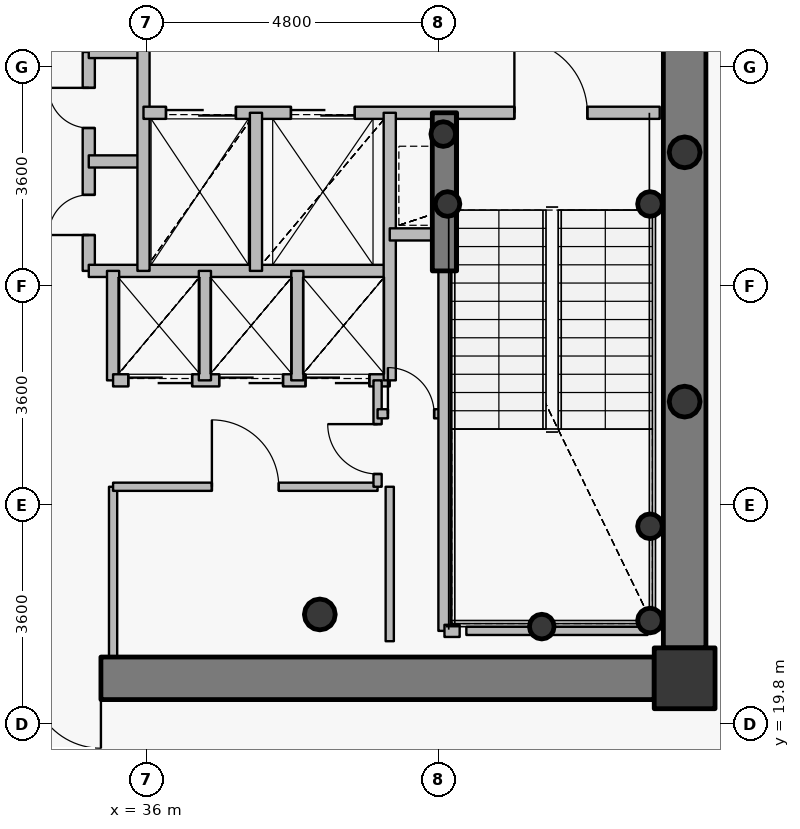
"""IFC4 building model, lengths in metres.
Left out: names, types, materials, properties, quantities, classifications, styles, units other than length and angle.
Written with IfcOpenShell. Run it as: python <this file> out.ifc"""

import sys

from ifc_helpers import new_model, si_unit, direction, frame, frame_2d, origin, origin_2d, place, context, subcontext, project, spatial, rectangle, hollow_circle, extrude, source, transform, mapped, element, fill, save


model = new_model("IFC4")
c1 = context("Model", 3, precision=1e-05, world=origin(), true_north=direction((0.0, 1.0)))
c2 = subcontext(c1, "Body", "Model", "MODEL_VIEW")
j1 = project(units=[si_unit("LENGTHUNIT", "METRE"), si_unit("PLANEANGLEUNIT", "RADIAN")], contexts=[c1])
p1 = place(None, origin())
s1 = spatial("IfcSite", under=j1, at=p1, CompositionType="ELEMENT")
p2 = place(p1, origin())
s2 = spatial("IfcBuilding", under=s1, at=p2, CompositionType="ELEMENT")
p3 = place(p2, frame((0.0, 0.0, 314.25)))
s3 = spatial("IfcBuildingStorey", under=s2, at=p3, CompositionType="ELEMENT", Elevation=314.25)
p4 = place(p3, frame((44.85, 20.55, 0.0), z_axis=(0.0, 0.0, 1.0), x_axis=(1.0, 0.0, 0.0)))
e1 = element("IfcColumn", 1, at=p4, inside=s3, PredefinedType="COLUMN", context=c2, shape_type="SweptSolid", body=[
    extrude(rectangle(XDim=1.0, YDim=1.0, at=origin_2d()), origin(), (0.0, 0.0, 1.0), 3.75),
])
p5 = place(p3, frame((38.85, 21.6, 0.0), z_axis=(0.0, 0.0, 1.0), x_axis=(1.0, 0.0, 0.0)))
e2 = element("IfcColumn", 2, at=p5, inside=s3, PredefinedType="COLUMN", context=c2, shape_type="SweptSolid", body=[
    extrude(hollow_circle(Radius=0.254, WallThickness=0.02, at=origin_2d()), origin(), (0.0, 0.0, 1.0), 3.75),
])
for number, where, z_axis, x_axis in (
    (3, (44.28, 21.5, 0.0), (0.0, 0.0, 1.0), (1.0, 0.0, 0.0)),
    (4, (44.28, 23.05, 0.0), (0.0, 0.0, 1.0), (1.0, 0.0, 0.0)),
    (5, (42.5, 21.4, 0.0), (0.0, 0.0, 1.0), (1.0, 0.0, 0.0)),
    (6, (40.95, 28.35, 0.0), (0.0, 0.0, 1.0), (1.0, 0.0, 0.0)),
    (7, (44.28, 28.35, 0.0), (0.0, 0.0, 1.0), (1.0, 0.0, 0.0)),
    (8, (40.88, 29.5, 0.0), (0.0, 0.0, 1.0), (1.0, 0.0, 0.0)),
):
    element("IfcColumn", number, at=place(p3, frame(where, z_axis=z_axis, x_axis=x_axis)), inside=s3, PredefinedType="COLUMN", context=c2, shape_type="SweptSolid", body=[
        extrude(hollow_circle(Radius=0.203, WallThickness=0.016, at=origin_2d()), origin(), (0.0, 0.0, 1.0), 3.75),
    ])
p6 = place(p3, frame((44.85, 32.95, 0.0), z_axis=(0.0, 0.0, 1.0), x_axis=(0.0, -1.0, 0.0)))
e9 = element("IfcWall", 9, at=p6, inside=s3, PredefinedType="SHEAR", context=c2, shape_type="SweptSolid", body=[
    extrude(rectangle(XDim=11.9, YDim=0.7, at=frame_2d((5.95, 0.0))), origin(), (0.0, 0.0, 1.0), 3.0),
])
p7 = place(p3, frame((44.35, 20.55, 0.0), z_axis=(0.0, 0.0, 1.0), x_axis=(-1.0, 0.0, 0.0)))
e10 = element("IfcWall", 10, at=p7, inside=s3, PredefinedType="SHEAR", context=c2, shape_type="SweptSolid", body=[
    extrude(rectangle(XDim=16.7, YDim=0.7, at=frame_2d((8.35, 0.0))), origin(), (0.0, 0.0, 1.0), 3.0),
])
p8 = place(p7, frame((12.925, 0.0, 0.0)))
e11 = element("IfcOpeningElement", 11, at=p8, cuts=e10, PredefinedType="OPENING", context=c2, shape_type="SweptSolid", body=[
    extrude(rectangle(XDim=1.15, YDim=2.15, at=origin_2d()), frame((0.575, 0.36, 1.075), z_axis=(0.0, -1.0, 0.0), x_axis=(1.0, 0.0, 0.0)), (0.0, 0.0, 1.0), 0.72),
])
p9 = place(p7, frame((9.1, 0.0, 0.0)))
e12 = element("IfcOpeningElement", 12, at=p9, cuts=e10, PredefinedType="OPENING", context=c2, shape_type="SweptSolid", body=[
    extrude(rectangle(XDim=1.15, YDim=2.15, at=origin_2d()), frame((0.575, 0.36, 1.075), z_axis=(0.0, -1.0, 0.0), x_axis=(1.0, 0.0, 0.0)), (0.0, 0.0, 1.0), 0.72),
])
p10 = place(p3, frame((40.9, 27.25, 0.0), z_axis=(0.0, 0.0, 1.0), x_axis=(0.0, 1.0, 0.0)))
e13 = element("IfcWall", 13, at=p10, inside=s3, PredefinedType="SHEAR", context=c2, shape_type="SweptSolid", body=[
    extrude(rectangle(XDim=2.6, YDim=0.4, at=frame_2d((1.3, 0.0))), origin(), (0.0, 0.0, 1.0), 3.05),
])
for number, where, z_axis, x_axis in (
    (14, (44.85, 25.1, 0.0), (0.0, 0.0, 1.0), (1.0, 0.0, 0.0)),
    (15, (44.85, 29.2, 0.0), (0.0, 0.0, 1.0), (1.0, 0.0, 0.0)),
):
    element("IfcColumn", number, at=place(p3, frame(where, z_axis=z_axis, x_axis=x_axis)), inside=s3, PredefinedType="COLUMN", context=c2, shape_type="SweptSolid", body=[
        extrude(hollow_circle(Radius=0.254, WallThickness=0.02, at=origin_2d()), origin(), (0.0, 0.0, 1.0), 3.75),
    ])
p11 = place(p3, frame((35.05, 27.25, 0.0), z_axis=(0.0, 0.0, 1.0), x_axis=(0.0, 1.0, 0.0)))
e16 = element("IfcWall", 16, at=p11, inside=s3, PredefinedType="PARTITIONING", context=c2, shape_type="SweptSolid", body=[
    extrude(rectangle(XDim=3.6, YDim=0.2, at=frame_2d((1.8, 0.0))), origin(), (0.0, 0.0, 1.0), 3.45),
])
p12 = place(p11, frame((0.59, 0.0, 0.0)))
e17 = element("IfcOpeningElement", 17, at=p12, cuts=e16, PredefinedType="OPENING", context=c2, shape_type="SweptSolid", body=[
    extrude(rectangle(XDim=0.66, YDim=2.05, at=origin_2d()), frame((0.33, 0.11, 1.025), z_axis=(0.0, -1.0, 0.0), x_axis=(1.0, 0.0, 0.0)), (0.0, 0.0, 1.0), 0.22),
])
p13 = place(p11, frame((2.35, 0.0, 0.0)))
e18 = element("IfcOpeningElement", 18, at=p13, cuts=e16, PredefinedType="OPENING", context=c2, shape_type="SweptSolid", body=[
    extrude(rectangle(XDim=0.66, YDim=2.05, at=origin_2d()), frame((0.33, 0.11, 1.025), z_axis=(0.0, -1.0, 0.0), x_axis=(1.0, 0.0, 0.0)), (0.0, 0.0, 1.0), 0.22),
])
p14 = place(p3, frame((35.05, 27.25, 0.0), z_axis=(0.0, 0.0, 1.0), x_axis=(1.0, 0.0, 0.0)))
e19 = element("IfcWall", 19, at=p14, inside=s3, PredefinedType="PARTITIONING", context=c2, shape_type="SweptSolid", body=[
    extrude(rectangle(XDim=4.95, YDim=0.2, at=frame_2d((2.475, 0.0))), origin(), (0.0, 0.0, 1.0), 3.035),
])
for number, where, z_axis, x_axis in (
    (20, (35.05, 29.05, 0.0), (0.0, 0.0, 1.0), (1.0, 0.0, 0.0)),
    (21, (35.05, 30.85, 0.0), (0.0, 0.0, 1.0), (1.0, 0.0, 0.0)),
):
    element("IfcWall", number, at=place(p3, frame(where, z_axis=z_axis, x_axis=x_axis)), inside=s3, PredefinedType="PARTITIONING", context=c2, shape_type="SweptSolid", body=[
        extrude(rectangle(XDim=0.9, YDim=0.2, at=frame_2d((0.45, 0.0))), origin(), (0.0, 0.0, 1.0), 3.45),
    ])
p15 = place(p3, frame((35.45, 20.9, 0.0), z_axis=(0.0, 0.0, 1.0), x_axis=(0.0, 1.0, 0.0)))
e22 = element("IfcWall", 22, at=p15, inside=s3, PredefinedType="PARTITIONING", context=c2, shape_type="SweptSolid", body=[
    extrude(rectangle(XDim=2.8, YDim=0.135, at=frame_2d((1.4, 0.0))), origin(), (0.0, 0.0, 1.0), 3.035),
])
p16 = place(p3, frame((35.45, 23.7, 0.0), z_axis=(0.0, 0.0, 1.0), x_axis=(1.0, 0.0, 0.0)))
e23 = element("IfcWall", 23, at=p16, inside=s3, PredefinedType="PARTITIONING", context=c2, shape_type="SweptSolid", body=[
    extrude(rectangle(XDim=4.35, YDim=0.135, at=frame_2d((2.175, 0.0))), origin(), (0.0, 0.0, 1.0), 3.035),
])
p17 = place(p16, frame((1.625, 0.0, 0.0)))
e24 = element("IfcOpeningElement", 24, at=p17, cuts=e23, PredefinedType="OPENING", context=c2, shape_type="SweptSolid", body=[
    extrude(rectangle(XDim=1.1, YDim=2.15, at=origin_2d()), frame((0.55, 0.078, 1.075), z_axis=(0.0, -1.0, 0.0), x_axis=(1.0, 0.0, 0.0)), (0.0, 0.0, 1.0), 0.155),
])
p18 = place(p3, frame((35.45, 25.45, 0.0), z_axis=(0.0, 0.0, 1.0), x_axis=(0.0, 1.0, 0.0)))
e25 = element("IfcWall", 25, at=p18, inside=s3, PredefinedType="PARTITIONING", context=c2, shape_type="SweptSolid", body=[
    extrude(rectangle(XDim=1.8, YDim=0.2, at=frame_2d((0.9, 0.0))), origin(), (0.0, 0.0, 1.0), 3.45),
])
p19 = place(p3, frame((35.45, 25.45, 0.0), z_axis=(0.0, 0.0, 1.0), x_axis=(1.0, 0.0, 0.0)))
e26 = element("IfcWall", 26, at=p19, inside=s3, PredefinedType="PARTITIONING", context=c2, shape_type="SweptSolid", body=[
    extrude(rectangle(XDim=4.55, YDim=0.2, at=frame_2d((2.275, 0.0))), origin(), (0.0, 0.0, 1.0), 3.035),
])
p20 = place(p19, frame((0.25, 0.0, 0.0)))
e27 = element("IfcOpeningElement", 27, at=p20, cuts=e26, PredefinedType="OPENING", context=c2, shape_type="SweptSolid", body=[
    extrude(rectangle(XDim=1.05, YDim=2.15, at=origin_2d()), frame((0.525, 0.11, 1.075), z_axis=(0.0, -1.0, 0.0), x_axis=(1.0, 0.0, 0.0)), (0.0, 0.0, 1.0), 0.22),
])
p21 = place(p19, frame((1.745, 0.0, 0.0)))
e28 = element("IfcOpeningElement", 28, at=p21, cuts=e26, PredefinedType="OPENING", context=c2, shape_type="SweptSolid", body=[
    extrude(rectangle(XDim=1.05, YDim=2.15, at=origin_2d()), frame((0.525, 0.11, 1.075), z_axis=(0.0, -1.0, 0.0), x_axis=(1.0, 0.0, 0.0)), (0.0, 0.0, 1.0), 0.22),
])
p22 = place(p19, frame((3.165, 0.0, 0.0)))
e29 = element("IfcOpeningElement", 29, at=p22, cuts=e26, PredefinedType="OPENING", context=c2, shape_type="SweptSolid", body=[
    extrude(rectangle(XDim=1.05, YDim=2.15, at=origin_2d()), frame((0.525, 0.11, 1.075), z_axis=(0.0, -1.0, 0.0), x_axis=(1.0, 0.0, 0.0)), (0.0, 0.0, 1.0), 0.22),
])
p23 = place(p3, frame((35.95, 27.25, 0.0), z_axis=(0.0, 0.0, 1.0), x_axis=(0.0, 1.0, 0.0)))
e30 = element("IfcWall", 30, at=p23, inside=s3, PredefinedType="PARTITIONING", context=c2, shape_type="SweptSolid", body=[
    extrude(rectangle(XDim=3.8, YDim=0.2, at=frame_2d((1.9, 0.0))), origin(), (0.0, 0.0, 1.0), 3.45),
])
p24 = place(p3, frame((35.95, 29.85, 0.0), z_axis=(0.0, 0.0, 1.0), x_axis=(1.0, 0.0, 0.0)))
e31 = element("IfcWall", 31, at=p24, inside=s3, PredefinedType="PARTITIONING", context=c2, shape_type="SweptSolid", body=[
    extrude(rectangle(XDim=8.49, YDim=0.2, at=frame_2d((4.245, 0.0))), origin(), (0.0, 0.0, 1.0), 3.035),
])
p25 = place(p24, frame((6.1, 0.0, 0.0)))
e32 = element("IfcOpeningElement", 32, at=p25, cuts=e31, PredefinedType="OPENING", context=c2, shape_type="SweptSolid", body=[
    extrude(rectangle(XDim=1.2, YDim=2.15, at=origin_2d()), frame((0.6, 0.11, 1.075), z_axis=(0.0, -1.0, 0.0), x_axis=(1.0, 0.0, 0.0)), (0.0, 0.0, 1.0), 0.22),
])
p26 = place(p24, frame((0.37, 0.0, 0.0)))
e33 = element("IfcOpeningElement", 33, at=p26, cuts=e31, PredefinedType="OPENING", context=c2, shape_type="SweptSolid", body=[
    extrude(rectangle(XDim=1.15, YDim=2.15, at=origin_2d()), frame((0.575, 0.11, 1.075), z_axis=(0.0, -1.0, 0.0), x_axis=(1.0, 0.0, 0.0)), (0.0, 0.0, 1.0), 0.22),
])
p27 = place(p24, frame((2.425, 0.0, 0.0)))
e34 = element("IfcOpeningElement", 34, at=p27, cuts=e31, PredefinedType="OPENING", context=c2, shape_type="SweptSolid", body=[
    extrude(rectangle(XDim=1.05, YDim=2.15, at=origin_2d()), frame((0.525, 0.11, 1.075), z_axis=(0.0, -1.0, 0.0), x_axis=(1.0, 0.0, 0.0)), (0.0, 0.0, 1.0), 0.22),
])
p28 = place(p3, frame((36.96, 25.45, 0.0), z_axis=(0.0, 0.0, 1.0), x_axis=(0.0, 1.0, 0.0)))
e35 = element("IfcWall", 35, at=p28, inside=s3, PredefinedType="PARTITIONING", context=c2, shape_type="SweptSolid", body=[
    extrude(rectangle(XDim=1.8, YDim=0.2, at=frame_2d((0.9, 0.0))), origin(), (0.0, 0.0, 1.0), 3.45),
])
p29 = place(p3, frame((37.8, 27.25, 0.0), z_axis=(0.0, 0.0, 1.0), x_axis=(0.0, 1.0, 0.0)))
e36 = element("IfcWall", 36, at=p29, inside=s3, PredefinedType="PARTITIONING", context=c2, shape_type="SweptSolid", body=[
    extrude(rectangle(XDim=2.6, YDim=0.2, at=frame_2d((1.3, 0.0))), origin(), (0.0, 0.0, 1.0), 3.45),
])
p30 = place(p3, frame((38.48, 25.45, 0.0), z_axis=(0.0, 0.0, 1.0), x_axis=(0.0, 1.0, 0.0)))
e37 = element("IfcWall", 37, at=p30, inside=s3, PredefinedType="PARTITIONING", context=c2, shape_type="SweptSolid", body=[
    extrude(rectangle(XDim=1.8, YDim=0.2, at=frame_2d((0.9, 0.0))), origin(), (0.0, 0.0, 1.0), 3.45),
])
p31 = place(p3, frame((39.8, 23.7, 0.0), z_axis=(0.0, 0.0, 1.0), x_axis=(0.0, 1.0, 0.0)))
e38 = element("IfcWall", 38, at=p31, inside=s3, PredefinedType="PARTITIONING", context=c2, shape_type="SweptSolid", body=[
    extrude(rectangle(XDim=1.75, YDim=0.135, at=frame_2d((0.875, 0.0))), origin(), (0.0, 0.0, 1.0), 3.45),
])
p32 = place(p31, frame((0.21, 0.0, 0.0)))
e39 = element("IfcOpeningElement", 39, at=p32, cuts=e38, PredefinedType="OPENING", context=c2, shape_type="SweptSolid", body=[
    extrude(rectangle(XDim=0.82, YDim=2.1, at=origin_2d()), frame((0.41, 0.078, 1.05), z_axis=(0.0, -1.0, 0.0), x_axis=(1.0, 0.0, 0.0)), (0.0, 0.0, 1.0), 0.155),
])
p33 = place(p3, frame((39.8, 24.9, 0.0), z_axis=(0.0, 0.0, 1.0), x_axis=(1.0, 0.0, 0.0)))
e40 = element("IfcWall", 40, at=p33, inside=s3, PredefinedType="PARTITIONING", context=c2, shape_type="SweptSolid", body=[
    extrude(rectangle(XDim=1.1, YDim=0.15, at=frame_2d((0.55, 0.0))), origin(), (0.0, 0.0, 1.0), 3.45),
])
p34 = place(p33, frame((0.17, 0.0, 0.0)))
e41 = element("IfcOpeningElement", 41, at=p34, cuts=e40, PredefinedType="OPENING", context=c2, shape_type="SweptSolid", body=[
    extrude(rectangle(XDim=0.76, YDim=2.1, at=origin_2d()), frame((0.38, 0.085, 1.05), z_axis=(0.0, -1.0, 0.0), x_axis=(1.0, 0.0, 0.0)), (0.0, 0.0, 1.0), 0.17),
])
p35 = place(p3, frame((40.0, 25.45, 0.0), z_axis=(0.0, 0.0, 1.0), x_axis=(0.0, 1.0, 0.0)))
e42 = element("IfcWall", 42, at=p35, inside=s3, PredefinedType="PARTITIONING", context=c2, shape_type="SweptSolid", body=[
    extrude(rectangle(XDim=4.4, YDim=0.2, at=frame_2d((2.2, 0.0))), origin(), (0.0, 0.0, 1.0), 3.45),
])
p36 = place(p3, frame((40.0, 27.85, 0.0), z_axis=(0.0, 0.0, 1.0), x_axis=(1.0, 0.0, 0.0)))
e43 = element("IfcWall", 43, at=p36, inside=s3, PredefinedType="PARTITIONING", context=c2, shape_type="SweptSolid", body=[
    extrude(rectangle(XDim=0.9, YDim=0.2, at=frame_2d((0.45, 0.0))), origin(), (0.0, 0.0, 1.0), 3.45),
])
p37 = place(p3, frame((40.9, 21.33, 0.0), z_axis=(0.0, 0.0, 1.0), x_axis=(0.0, 1.0, 0.0)))
e44 = element("IfcWall", 44, at=p37, inside=s3, PredefinedType="PARTITIONING", context=c2, shape_type="SweptSolid", body=[
    extrude(rectangle(XDim=5.91, YDim=0.2, at=frame_2d((2.955, 0.0))), origin(), (0.0, 0.0, 1.0), 2.985),
])
p38 = place(p3, frame((40.9, 21.33, 0.0), z_axis=(0.0, 0.0, 1.0), x_axis=(1.0, 0.0, 0.0)))
e45 = element("IfcWall", 45, at=p38, inside=s3, PredefinedType="PARTITIONING", context=c2, shape_type="SweptSolid", body=[
    extrude(rectangle(XDim=0.25, YDim=0.2, at=frame_2d((0.125, 0.0))), origin(), (0.0, 0.0, 1.0), 2.985),
])
p39 = place(p3, frame((44.24, 21.33, 0.0), z_axis=(0.0, 0.0, 1.0), x_axis=(-1.0, 0.0, 0.0)))
e46 = element("IfcWall", 46, at=p39, inside=s3, PredefinedType="PARTITIONING", context=c2, shape_type="SweptSolid", body=[
    extrude(rectangle(XDim=2.98, YDim=0.135, at=frame_2d((1.49, 0.0))), origin(), (0.0, 0.0, 1.0), 2.985),
])
p40 = place(p3, frame((40.0, 23.7, 0.0), z_axis=(0.0, 0.0, 1.0), x_axis=(0.0, -1.0, 0.0)))
e47 = element("IfcWall", 47, at=p40, inside=s3, PredefinedType="PARTITIONING", context=c2, shape_type="SweptSolid", body=[
    extrude(rectangle(XDim=2.54, YDim=0.135, at=frame_2d((1.27, 0.0))), origin(), (0.0, 0.0, 1.0), 2.985),
])
p41 = place(p3, frame((44.36, 20.2, 0.0), z_axis=(0.0, 0.0, 1.0), x_axis=(1.0, 0.0, 0.0)))
e48 = element("IfcWall", 48, at=p41, inside=s3, PredefinedType="PARTITIONING", context=c2, shape_type="SweptSolid", body=[
    extrude(rectangle(XDim=0.84, YDim=0.135, at=frame_2d((0.42, 0.0))), origin(), (0.0, 0.0, 1.0), 2.985),
])
p42 = place(p3, frame((45.2, 20.508, 0.0), z_axis=(0.0, 0.0, 1.0), x_axis=(0.0, 1.0, 0.0)))
e49 = element("IfcWall", 49, at=p42, inside=s3, PredefinedType="PARTITIONING", context=c2, shape_type="SweptSolid", body=[
    extrude(rectangle(XDim=0.532, YDim=0.135, at=frame_2d((0.266, 0.0))), origin(), (0.0, 0.0, 1.0), 3.45),
])
m1 = source(origin(), c2, "Body", "SweptSolid", [
    extrude(rectangle(XDim=1.15, YDim=2.15, at=origin_2d()), frame((0.575, 0.025, 1.075), z_axis=(0.0, -1.0, 0.0), x_axis=(1.0, 0.0, 0.0)), (0.0, 0.0, 1.0), 0.05),
])
p43 = place(p9, origin())
e50 = element("IfcDoor", 50, at=p43, inside=s3, OperationType="SINGLE_SWING_LEFT", PredefinedType="DOOR", context=c2, shape_type="MappedRepresentation", body=[
    mapped(m1, transform((0.0, 0.0, 0.0), x_axis=(1.0, 0.0, 0.0), y_axis=(0.0, 1.0, 0.0), z_axis=(0.0, 0.0, 1.0), scale=1.0)),
])
fill(e12, e50)
m2 = source(origin(), c2, "Body", "SweptSolid", [
    extrude(rectangle(XDim=1.2, YDim=2.15, at=origin_2d()), frame((0.6, 0.025, 1.075), z_axis=(0.0, -1.0, 0.0), x_axis=(1.0, 0.0, 0.0)), (0.0, 0.0, 1.0), 0.05),
])
p44 = place(p25, origin())
e51 = element("IfcDoor", 51, at=p44, inside=s3, OperationType="SINGLE_SWING_LEFT", PredefinedType="DOOR", context=c2, shape_type="MappedRepresentation", body=[
    mapped(m2, transform((0.0, 0.0, 0.0), x_axis=(1.0, 0.0, 0.0), y_axis=(0.0, 1.0, 0.0), z_axis=(0.0, 0.0, 1.0), scale=1.0)),
])
fill(e32, e51)
m3 = source(origin(), c2, "Body", "SweptSolid", [
    extrude(rectangle(XDim=1.15, YDim=2.15, at=origin_2d()), frame((0.575, 0.025, 1.075), z_axis=(0.0, -1.0, 0.0), x_axis=(1.0, 0.0, 0.0)), (0.0, 0.0, 1.0), 0.05),
])
p45 = place(p26, origin())
e52 = element("IfcDoor", 52, at=p45, inside=s3, OperationType="DOUBLE_DOOR_SLIDING", PredefinedType="USERDEFINED", context=c2, shape_type="MappedRepresentation", body=[
    mapped(m3, transform((0.0, 0.0, 0.0), x_axis=(1.0, 0.0, 0.0), y_axis=(0.0, 1.0, 0.0), z_axis=(0.0, 0.0, 1.0), scale=1.0)),
])
fill(e33, e52)
m4 = source(origin(), c2, "Body", "SweptSolid", [
    extrude(rectangle(XDim=1.05, YDim=2.15, at=origin_2d()), frame((0.525, 0.025, 1.075), z_axis=(0.0, -1.0, 0.0), x_axis=(1.0, 0.0, 0.0)), (0.0, 0.0, 1.0), 0.05),
])
p46 = place(p27, origin())
e53 = element("IfcDoor", 53, at=p46, inside=s3, OperationType="DOUBLE_DOOR_SLIDING", PredefinedType="USERDEFINED", context=c2, shape_type="MappedRepresentation", body=[
    mapped(m4, transform((0.0, 0.0, 0.0), x_axis=(1.0, 0.0, 0.0), y_axis=(0.0, 1.0, 0.0), z_axis=(0.0, 0.0, 1.0), scale=1.0)),
])
fill(e34, e53)
p47 = place(p20, origin())
e54 = element("IfcDoor", 54, at=p47, inside=s3, OperationType="DOUBLE_DOOR_SLIDING", PredefinedType="USERDEFINED", context=c2, shape_type="MappedRepresentation", body=[
    mapped(m4, transform((0.0, 0.0, 0.0), x_axis=(1.0, 0.0, 0.0), y_axis=(0.0, 1.0, 0.0), z_axis=(0.0, 0.0, 1.0), scale=1.0)),
])
fill(e27, e54)
p48 = place(p21, origin())
e55 = element("IfcDoor", 55, at=p48, inside=s3, OperationType="DOUBLE_DOOR_SLIDING", PredefinedType="USERDEFINED", context=c2, shape_type="MappedRepresentation", body=[
    mapped(m4, transform((0.0, 0.0, 0.0), x_axis=(1.0, 0.0, 0.0), y_axis=(0.0, 1.0, 0.0), z_axis=(0.0, 0.0, 1.0), scale=1.0)),
])
fill(e28, e55)
p49 = place(p22, origin())
e56 = element("IfcDoor", 56, at=p49, inside=s3, OperationType="DOUBLE_DOOR_SLIDING", PredefinedType="USERDEFINED", context=c2, shape_type="MappedRepresentation", body=[
    mapped(m4, transform((0.0, 0.0, 0.0), x_axis=(1.0, 0.0, 0.0), y_axis=(0.0, 1.0, 0.0), z_axis=(0.0, 0.0, 1.0), scale=1.0)),
])
fill(e29, e56)
m5 = source(origin(), c2, "Body", "SweptSolid", [
    extrude(rectangle(XDim=0.66, YDim=2.05, at=origin_2d()), frame((0.33, 0.025, 1.025), z_axis=(0.0, -1.0, 0.0), x_axis=(1.0, 0.0, 0.0)), (0.0, 0.0, 1.0), 0.05),
])
p50 = place(p12, origin())
e57 = element("IfcDoor", 57, at=p50, inside=s3, OperationType="SINGLE_SWING_LEFT", PredefinedType="USERDEFINED", context=c2, shape_type="MappedRepresentation", body=[
    mapped(m5, transform((0.0, 0.0, 0.0), x_axis=(1.0, 0.0, 0.0), y_axis=(0.0, 1.0, 0.0), z_axis=(0.0, 0.0, 1.0), scale=1.0)),
])
fill(e17, e57)
p51 = place(p13, origin())
e58 = element("IfcDoor", 58, at=p51, inside=s3, OperationType="SINGLE_SWING_RIGHT", PredefinedType="USERDEFINED", context=c2, shape_type="MappedRepresentation", body=[
    mapped(m5, transform((0.0, 0.0, 0.0), x_axis=(1.0, 0.0, 0.0), y_axis=(0.0, 1.0, 0.0), z_axis=(0.0, 0.0, 1.0), scale=1.0)),
])
fill(e18, e58)
m6 = source(origin(), c2, "Body", "SweptSolid", [
    extrude(rectangle(XDim=1.1, YDim=2.15, at=origin_2d()), frame((0.55, 0.025, 1.075), z_axis=(0.0, -1.0, 0.0), x_axis=(1.0, 0.0, 0.0)), (0.0, 0.0, 1.0), 0.05),
])
p52 = place(p17, origin())
e59 = element("IfcDoor", 59, at=p52, inside=s3, OperationType="SINGLE_SWING_LEFT", PredefinedType="DOOR", context=c2, shape_type="MappedRepresentation", body=[
    mapped(m6, transform((0.0, 0.0, 0.0), x_axis=(1.0, 0.0, 0.0), y_axis=(0.0, 1.0, 0.0), z_axis=(0.0, 0.0, 1.0), scale=1.0)),
])
fill(e24, e59)
m7 = source(origin(), c2, "Body", "SweptSolid", [
    extrude(rectangle(XDim=0.82, YDim=2.1, at=origin_2d()), frame((0.41, 0.025, 1.05), z_axis=(0.0, -1.0, 0.0), x_axis=(1.0, 0.0, 0.0)), (0.0, 0.0, 1.0), 0.05),
])
p53 = place(p32, origin())
e60 = element("IfcDoor", 60, at=p53, inside=s3, OperationType="SINGLE_SWING_RIGHT", PredefinedType="DOOR", context=c2, shape_type="MappedRepresentation", body=[
    mapped(m7, transform((0.0, 0.0, 0.0), x_axis=(1.0, 0.0, 0.0), y_axis=(0.0, 1.0, 0.0), z_axis=(0.0, 0.0, 1.0), scale=1.0)),
])
fill(e39, e60)
m8 = source(origin(), c2, "Body", "SweptSolid", [
    extrude(rectangle(XDim=0.76, YDim=2.1, at=origin_2d()), frame((0.38, 0.025, 1.05), z_axis=(0.0, -1.0, 0.0), x_axis=(1.0, 0.0, 0.0)), (0.0, 0.0, 1.0), 0.05),
])
p54 = place(p34, origin())
e61 = element("IfcDoor", 61, at=p54, inside=s3, OperationType="SINGLE_SWING_LEFT", PredefinedType="DOOR", context=c2, shape_type="MappedRepresentation", body=[
    mapped(m8, transform((0.0, 0.0, 0.0), x_axis=(1.0, 0.0, 0.0), y_axis=(0.0, 1.0, 0.0), z_axis=(0.0, 0.0, 1.0), scale=1.0)),
])
fill(e41, e61)
save(model, sys.argv[1])
